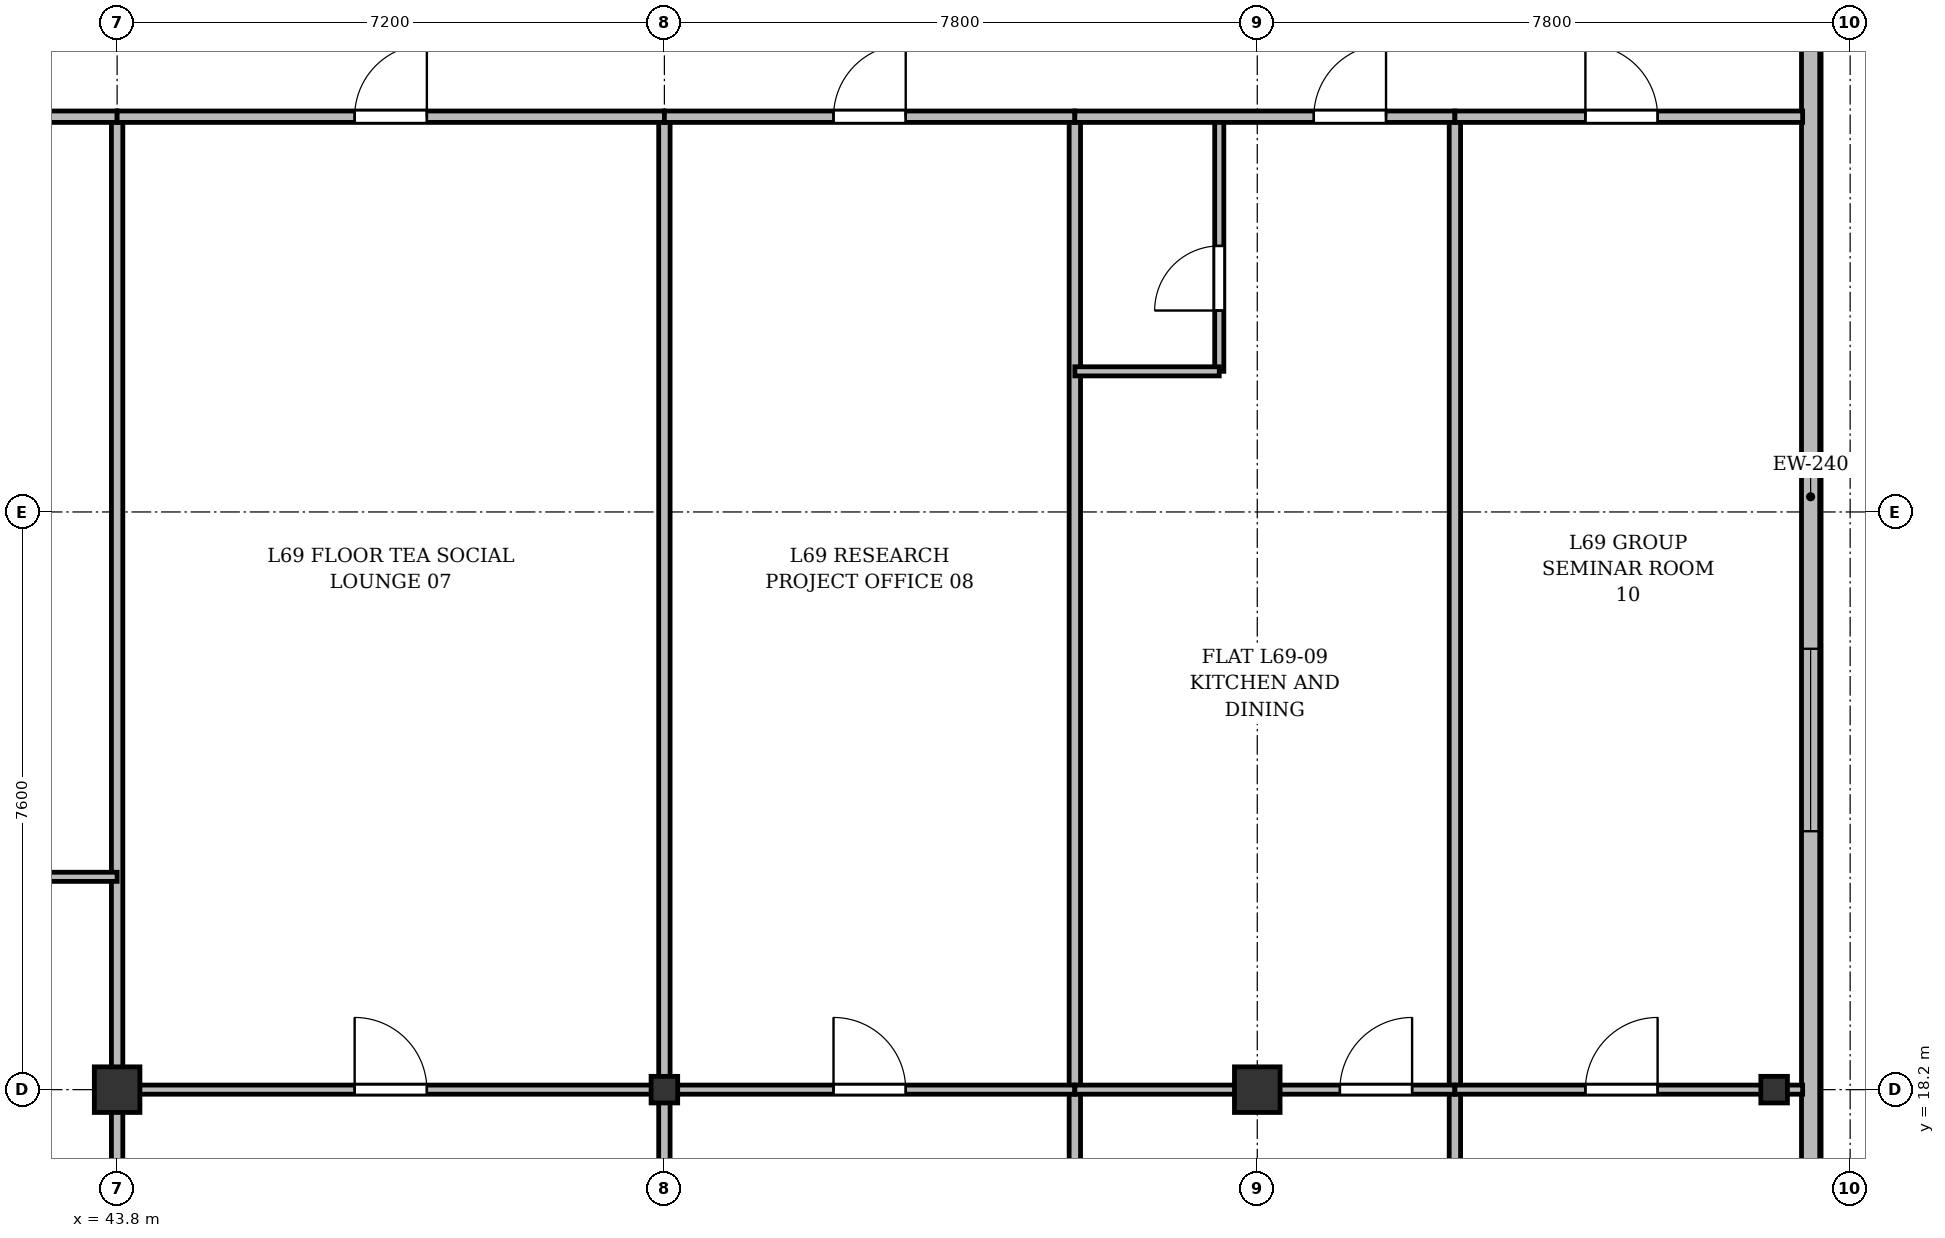
"""IFC4 building model, lengths in metres.
Left out: names, types, materials, properties, quantities, classifications, styles, units other than length and angle.
Written with IfcOpenShell. Run it as: python <this file> out.ifc"""

import sys

from ifc_helpers import new_model, si_unit, direction, frame, frame_2d, origin, origin_2d, place, context, subcontext, project, spatial, rectangle, i_section, extrude, source, transform, mapped, element, fill, save


model = new_model("IFC4")
c1 = context("Model", 3, precision=1e-05, world=origin(), true_north=direction((0.0, 1.0)))
c2 = subcontext(c1, "Body", "Model", "MODEL_VIEW")
j1 = project(units=[si_unit("LENGTHUNIT", "METRE"), si_unit("PLANEANGLEUNIT", "RADIAN")], contexts=[c1])
p1 = place(None, origin())
s1 = spatial("IfcSite", under=j1, at=p1, CompositionType="ELEMENT")
p2 = place(p1, origin())
s2 = spatial("IfcBuilding", under=s1, at=p2, CompositionType="ELEMENT")
p3 = place(p2, frame((0.0, 0.0, 266.7)))
s3 = spatial("IfcBuildingStorey", under=s2, at=p3, CompositionType="ELEMENT", Elevation=266.7)
m1 = source(origin(), c2, "Body", "SweptSolid", [
    extrude(rectangle(XDim=0.6, YDim=0.6, at=origin_2d()), origin(), (0.0, 0.0, 1.0), 3.6),
])
p4 = place(p3, frame((43.8, 18.2, 0.0), z_axis=(0.0, 0.0, 1.0), x_axis=(1.0, 0.0, 0.0)))
e1 = element("IfcColumn", 1, at=p4, inside=s3, PredefinedType="COLUMN", context=c2, shape_type="MappedRepresentation", body=[
    mapped(m1, transform((0.0, 0.0, 0.0), x_axis=(1.0, 0.0, 0.0), y_axis=(0.0, 1.0, 0.0), z_axis=(0.0, 0.0, 1.0), scale=1.0)),
])
m2 = source(origin(), c2, "Body", "SweptSolid", [
    extrude(i_section(OverallWidth=0.35, OverallDepth=0.35, WebThickness=0.018, FlangeThickness=0.028, at=origin_2d()), origin(), (0.0, 0.0, 1.0), 3.6),
])
p5 = place(p3, frame((51.0, 18.2, 0.0), z_axis=(0.0, 0.0, 1.0), x_axis=(1.0, 0.0, 0.0)))
e2 = element("IfcColumn", 2, at=p5, inside=s3, PredefinedType="COLUMN", context=c2, shape_type="MappedRepresentation", body=[
    mapped(m2, transform((0.0, 0.0, 0.0), x_axis=(1.0, 0.0, 0.0), y_axis=(0.0, 1.0, 0.0), z_axis=(0.0, 0.0, 1.0), scale=1.0)),
])
p6 = place(p3, frame((58.8, 18.2, 0.0), z_axis=(0.0, 0.0, 1.0), x_axis=(1.0, 0.0, 0.0)))
e3 = element("IfcColumn", 3, at=p6, inside=s3, PredefinedType="COLUMN", context=c2, shape_type="MappedRepresentation", body=[
    mapped(m1, transform((0.0, 0.0, 0.0), x_axis=(1.0, 0.0, 0.0), y_axis=(0.0, 1.0, 0.0), z_axis=(0.0, 0.0, 1.0), scale=1.0)),
])
p7 = place(p3, frame((65.6, 18.2, 0.0), z_axis=(0.0, 0.0, 1.0), x_axis=(1.0, 0.0, 0.0)))
e4 = element("IfcColumn", 4, at=p7, inside=s3, PredefinedType="COLUMN", context=c2, shape_type="MappedRepresentation", body=[
    mapped(m2, transform((0.0, 0.0, 0.0), x_axis=(1.0, 0.0, 0.0), y_axis=(0.0, 1.0, 0.0), z_axis=(0.0, 0.0, 1.0), scale=1.0)),
])
p8 = place(p3, frame((66.08, 45.5, 0.0), z_axis=(0.0, 0.0, 1.0), x_axis=(0.0, -1.0, 0.0)))
e5 = element("IfcWall", 5, at=p8, inside=s3, PredefinedType="SOLIDWALL", context=c2, shape_type="SweptSolid", body=[
    extrude(rectangle(XDim=39.0, YDim=0.24, at=frame_2d((19.5, 0.0))), origin(), (0.0, 0.0, 1.0), 3.37),
])
p9 = place(p8, frame((36.35, 0.0, 0.92)))
e6 = element("IfcOpeningElement", 6, at=p9, cuts=e5, PredefinedType="OPENING", context=c2, shape_type="SweptSolid", body=[
    extrude(rectangle(XDim=1.2, YDim=1.65, at=frame_2d((0.6, 0.825))), frame((0.0, 0.13, 0.0), z_axis=(0.0, -1.0, 0.0), x_axis=(1.0, 0.0, 0.0)), (0.0, 0.0, 1.0), 0.26),
])
p10 = place(p8, frame((32.9, 0.0, 0.92)))
e7 = element("IfcOpeningElement", 7, at=p10, cuts=e5, PredefinedType="OPENING", context=c2, shape_type="SweptSolid", body=[
    extrude(rectangle(XDim=2.4, YDim=2.1, at=frame_2d((1.2, 1.05))), frame((0.0, 0.13, 0.0), z_axis=(0.0, -1.0, 0.0), x_axis=(1.0, 0.0, 0.0)), (0.0, 0.0, 1.0), 0.26),
])
p11 = place(p8, frame((28.7, 0.0, 0.92)))
e8 = element("IfcOpeningElement", 8, at=p11, cuts=e5, PredefinedType="OPENING", context=c2, shape_type="SweptSolid", body=[
    extrude(rectangle(XDim=2.4, YDim=2.1, at=frame_2d((1.2, 1.05))), frame((0.0, 0.13, 0.0), z_axis=(0.0, -1.0, 0.0), x_axis=(1.0, 0.0, 0.0)), (0.0, 0.0, 1.0), 0.26),
])
p12 = place(p8, frame((21.5, 0.0, 0.92)))
e9 = element("IfcOpeningElement", 9, at=p12, cuts=e5, PredefinedType="OPENING", context=c2, shape_type="SweptSolid", body=[
    extrude(rectangle(XDim=2.4, YDim=2.1, at=frame_2d((1.2, 1.05))), frame((0.0, 0.13, 0.0), z_axis=(0.0, -1.0, 0.0), x_axis=(1.0, 0.0, 0.0)), (0.0, 0.0, 1.0), 0.26),
])
p13 = place(p8, frame((7.5, 0.0, 0.92)))
e10 = element("IfcOpeningElement", 10, at=p13, cuts=e5, PredefinedType="OPENING", context=c2, shape_type="SweptSolid", body=[
    extrude(rectangle(XDim=2.4, YDim=2.1, at=frame_2d((1.2, 1.05))), frame((0.0, 0.13, 0.0), z_axis=(0.0, -1.0, 0.0), x_axis=(1.0, 0.0, 0.0)), (0.0, 0.0, 1.0), 0.26),
])
p14 = place(p8, frame((4.5, 0.0, 0.92)))
e11 = element("IfcOpeningElement", 11, at=p14, cuts=e5, PredefinedType="OPENING", context=c2, shape_type="SweptSolid", body=[
    extrude(rectangle(XDim=1.2, YDim=1.65, at=frame_2d((0.6, 0.825))), frame((0.0, 0.13, 0.0), z_axis=(0.0, -1.0, 0.0), x_axis=(1.0, 0.0, 0.0)), (0.0, 0.0, 1.0), 0.26),
])
p15 = place(p8, frame((1.15, 0.0, 0.92)))
e12 = element("IfcOpeningElement", 12, at=p15, cuts=e5, PredefinedType="OPENING", context=c2, shape_type="SweptSolid", body=[
    extrude(rectangle(XDim=1.2, YDim=1.65, at=frame_2d((0.6, 0.825))), frame((0.0, 0.13, 0.0), z_axis=(0.0, -1.0, 0.0), x_axis=(1.0, 0.0, 0.0)), (0.0, 0.0, 1.0), 0.26),
])
for number, where, z_axis, x_axis in (
    (13, (43.8, 3.725, 0.0), (0.0, 0.0, 1.0), (0.0, 1.0, 0.0)),
    (14, (51.0, 3.725, 0.0), (0.0, 0.0, 1.0), (0.0, 1.0, 0.0)),
):
    element("IfcWall", number, at=place(p3, frame(where, z_axis=z_axis, x_axis=x_axis)), inside=s3, PredefinedType="PARTITIONING", context=c2, shape_type="SweptSolid", body=[
        extrude(rectangle(XDim=27.275, YDim=0.15, at=frame_2d((13.637, 0.0))), origin(), (0.0, 0.0, 1.0), 2.87),
    ])
for number, where, z_axis, x_axis in (
    (15, (56.4, 3.725, 0.0), (0.0, 0.0, 1.0), (0.0, 1.0, 0.0)),
    (16, (61.4, 3.725, 0.0), (0.0, 0.0, 1.0), (0.0, 1.0, 0.0)),
):
    element("IfcWall", number, at=place(p3, frame(where, z_axis=z_axis, x_axis=x_axis)), inside=s3, PredefinedType="PARTITIONING", context=c2, shape_type="SweptSolid", body=[
        extrude(rectangle(XDim=27.275, YDim=0.15, at=frame_2d((13.637, 0.0))), origin(), (0.0, 0.0, 1.0), 2.92),
    ])
p16 = place(p3, frame((36.4, 21.0, 0.0), z_axis=(0.0, 0.0, 1.0), x_axis=(1.0, 0.0, 0.0)))
e17 = element("IfcWall", 17, at=p16, inside=s3, PredefinedType="PARTITIONING", context=c2, shape_type="SweptSolid", body=[
    extrude(rectangle(XDim=7.4, YDim=0.12, at=frame_2d((3.7, 0.0))), origin(), (0.0, 0.0, 1.0), 2.87),
])
p17 = place(p16, frame((3.133, 0.0, 0.0)))
e18 = element("IfcOpeningElement", 18, at=p17, cuts=e17, PredefinedType="OPENING", context=c2, shape_type="SweptSolid", body=[
    extrude(rectangle(XDim=0.95, YDim=2.15, at=frame_2d((0.475, 1.075))), frame((0.0, 0.07, 0.0), z_axis=(0.0, -1.0, 0.0), x_axis=(1.0, 0.0, 0.0)), (0.0, 0.0, 1.0), 0.14),
])
p18 = place(p3, frame((36.4, 31.0, 0.0), z_axis=(0.0, 0.0, 1.0), x_axis=(1.0, 0.0, 0.0)))
e19 = element("IfcWall", 19, at=p18, inside=s3, PredefinedType="PARTITIONING", context=c2, shape_type="SweptSolid", body=[
    extrude(rectangle(XDim=7.4, YDim=0.15, at=frame_2d((3.7, 0.0))), origin(), (0.0, 0.0, 1.0), 2.87),
])
p19 = place(p18, frame((4.967, 0.0, 0.0)))
e20 = element("IfcOpeningElement", 20, at=p19, cuts=e19, PredefinedType="OPENING", context=c2, shape_type="SweptSolid", body=[
    extrude(rectangle(XDim=0.95, YDim=2.15, at=frame_2d((0.475, 1.075))), frame((0.0, 0.085, 0.0), z_axis=(0.0, -1.0, 0.0), x_axis=(1.0, 0.0, 0.0)), (0.0, 0.0, 1.0), 0.17),
])
p20 = place(p3, frame((43.8, 31.0, 0.0), z_axis=(0.0, 0.0, 1.0), x_axis=(1.0, 0.0, 0.0)))
e21 = element("IfcWall", 21, at=p20, inside=s3, PredefinedType="PARTITIONING", context=c2, shape_type="SweptSolid", body=[
    extrude(rectangle(XDim=7.2, YDim=0.15, at=frame_2d((3.6, 0.0))), origin(), (0.0, 0.0, 1.0), 2.87),
])
p21 = place(p20, frame((3.125, 0.0, 0.0)))
e22 = element("IfcOpeningElement", 22, at=p21, cuts=e21, PredefinedType="OPENING", context=c2, shape_type="SweptSolid", body=[
    extrude(rectangle(XDim=0.95, YDim=2.15, at=frame_2d((0.475, 1.075))), frame((0.0, 0.085, 0.0), z_axis=(0.0, -1.0, 0.0), x_axis=(1.0, 0.0, 0.0)), (0.0, 0.0, 1.0), 0.17),
])
p22 = place(p3, frame((43.8, 18.2, 0.0), z_axis=(0.0, 0.0, 1.0), x_axis=(1.0, 0.0, 0.0)))
e23 = element("IfcWall", 23, at=p22, inside=s3, PredefinedType="PARTITIONING", context=c2, shape_type="SweptSolid", body=[
    extrude(rectangle(XDim=7.2, YDim=0.12, at=frame_2d((3.6, 0.0))), origin(), (0.0, 0.0, 1.0), 2.92),
])
p23 = place(p22, frame((3.125, 0.0, 0.0)))
e24 = element("IfcOpeningElement", 24, at=p23, cuts=e23, PredefinedType="OPENING", context=c2, shape_type="SweptSolid", body=[
    extrude(rectangle(XDim=0.95, YDim=2.15, at=frame_2d((0.475, 1.075))), frame((0.0, 0.07, 0.0), z_axis=(0.0, -1.0, 0.0), x_axis=(1.0, 0.0, 0.0)), (0.0, 0.0, 1.0), 0.14),
])
p24 = place(p3, frame((51.0, 31.0, 0.0), z_axis=(0.0, 0.0, 1.0), x_axis=(1.0, 0.0, 0.0)))
e25 = element("IfcWall", 25, at=p24, inside=s3, PredefinedType="PARTITIONING", context=c2, shape_type="SweptSolid", body=[
    extrude(rectangle(XDim=5.4, YDim=0.15, at=frame_2d((2.7, 0.0))), origin(), (0.0, 0.0, 1.0), 2.87),
])
p25 = place(p24, frame((2.225, 0.0, 0.0)))
e26 = element("IfcOpeningElement", 26, at=p25, cuts=e25, PredefinedType="OPENING", context=c2, shape_type="SweptSolid", body=[
    extrude(rectangle(XDim=0.95, YDim=2.15, at=frame_2d((0.475, 1.075))), frame((0.0, 0.085, 0.0), z_axis=(0.0, -1.0, 0.0), x_axis=(1.0, 0.0, 0.0)), (0.0, 0.0, 1.0), 0.17),
])
p26 = place(p3, frame((51.0, 18.2, 0.0), z_axis=(0.0, 0.0, 1.0), x_axis=(1.0, 0.0, 0.0)))
e27 = element("IfcWall", 27, at=p26, inside=s3, PredefinedType="PARTITIONING", context=c2, shape_type="SweptSolid", body=[
    extrude(rectangle(XDim=5.4, YDim=0.12, at=frame_2d((2.7, 0.0))), origin(), (0.0, 0.0, 1.0), 2.92),
])
p27 = place(p26, frame((2.225, 0.0, 0.0)))
e28 = element("IfcOpeningElement", 28, at=p27, cuts=e27, PredefinedType="OPENING", context=c2, shape_type="SweptSolid", body=[
    extrude(rectangle(XDim=0.95, YDim=2.15, at=frame_2d((0.475, 1.075))), frame((0.0, 0.07, 0.0), z_axis=(0.0, -1.0, 0.0), x_axis=(1.0, 0.0, 0.0)), (0.0, 0.0, 1.0), 0.14),
])
p28 = place(p3, frame((56.4, 18.2, 0.0), z_axis=(0.0, 0.0, 1.0), x_axis=(1.0, 0.0, 0.0)))
e29 = element("IfcWall", 29, at=p28, inside=s3, PredefinedType="PARTITIONING", context=c2, shape_type="SweptSolid", body=[
    extrude(rectangle(XDim=5.0, YDim=0.12, at=frame_2d((2.5, 0.0))), origin(), (0.0, 0.0, 1.0), 2.92),
])
p29 = place(p28, frame((3.487, 0.0, 0.0)))
e30 = element("IfcOpeningElement", 30, at=p29, cuts=e29, PredefinedType="OPENING", context=c2, shape_type="SweptSolid", body=[
    extrude(rectangle(XDim=0.95, YDim=2.15, at=frame_2d((0.475, 1.075))), frame((0.0, 0.07, 0.0), z_axis=(0.0, -1.0, 0.0), x_axis=(1.0, 0.0, 0.0)), (0.0, 0.0, 1.0), 0.14),
])
p30 = place(p3, frame((58.3, 27.65, 0.0), z_axis=(0.0, 0.0, 1.0), x_axis=(0.0, 1.0, 0.0)))
e31 = element("IfcWall", 31, at=p30, inside=s3, PredefinedType="PARTITIONING", context=c2, shape_type="SweptSolid", body=[
    extrude(rectangle(XDim=3.35, YDim=0.12, at=frame_2d((1.675, 0.0))), origin(), (0.0, 0.0, 1.0), 3.37),
])
p31 = place(p30, frame((0.8, 0.0, 0.0)))
e32 = element("IfcOpeningElement", 32, at=p31, cuts=e31, PredefinedType="OPENING", context=c2, shape_type="SweptSolid", body=[
    extrude(rectangle(XDim=0.85, YDim=2.1, at=frame_2d((0.425, 1.05))), frame((0.0, 0.07, 0.0), z_axis=(0.0, -1.0, 0.0), x_axis=(1.0, 0.0, 0.0)), (0.0, 0.0, 1.0), 0.14),
])
p32 = place(p3, frame((56.4, 27.65, 0.0), z_axis=(0.0, 0.0, 1.0), x_axis=(1.0, 0.0, 0.0)))
e33 = element("IfcWall", 33, at=p32, inside=s3, PredefinedType="PARTITIONING", context=c2, shape_type="SweptSolid", body=[
    extrude(rectangle(XDim=1.9, YDim=0.12, at=frame_2d((0.95, 0.0))), origin(), (0.0, 0.0, 1.0), 3.37),
])
p33 = place(p3, frame((56.4, 31.0, 0.0), z_axis=(0.0, 0.0, 1.0), x_axis=(1.0, 0.0, 0.0)))
e34 = element("IfcWall", 34, at=p33, inside=s3, PredefinedType="PARTITIONING", context=c2, shape_type="SweptSolid", body=[
    extrude(rectangle(XDim=5.0, YDim=0.15, at=frame_2d((2.5, 0.0))), origin(), (0.0, 0.0, 1.0), 2.87),
])
p34 = place(p33, frame((3.144, 0.0, 0.0)))
e35 = element("IfcOpeningElement", 35, at=p34, cuts=e34, PredefinedType="OPENING", context=c2, shape_type="SweptSolid", body=[
    extrude(rectangle(XDim=0.95, YDim=2.15, at=frame_2d((0.475, 1.075))), frame((0.0, 0.085, 0.0), z_axis=(0.0, -1.0, 0.0), x_axis=(1.0, 0.0, 0.0)), (0.0, 0.0, 1.0), 0.17),
])
p35 = place(p3, frame((61.4, 31.0, 0.0), z_axis=(0.0, 0.0, 1.0), x_axis=(1.0, 0.0, 0.0)))
e36 = element("IfcWall", 36, at=p35, inside=s3, PredefinedType="PARTITIONING", context=c2, shape_type="SweptSolid", body=[
    extrude(rectangle(XDim=4.575, YDim=0.15, at=frame_2d((2.288, 0.0))), origin(), (0.0, 0.0, 1.0), 2.87),
])
p36 = place(p35, frame((1.717, 0.0, 0.0)))
e37 = element("IfcOpeningElement", 37, at=p36, cuts=e36, PredefinedType="OPENING", context=c2, shape_type="SweptSolid", body=[
    extrude(rectangle(XDim=0.95, YDim=2.15, at=frame_2d((0.475, 1.075))), frame((0.0, 0.085, 0.0), z_axis=(0.0, -1.0, 0.0), x_axis=(1.0, 0.0, 0.0)), (0.0, 0.0, 1.0), 0.17),
])
p37 = place(p3, frame((61.4, 18.2, 0.0), z_axis=(0.0, 0.0, 1.0), x_axis=(1.0, 0.0, 0.0)))
e38 = element("IfcWall", 38, at=p37, inside=s3, PredefinedType="PARTITIONING", context=c2, shape_type="SweptSolid", body=[
    extrude(rectangle(XDim=4.575, YDim=0.12, at=frame_2d((2.288, 0.0))), origin(), (0.0, 0.0, 1.0), 2.92),
])
p38 = place(p37, frame((1.717, 0.0, 0.0)))
e39 = element("IfcOpeningElement", 39, at=p38, cuts=e38, PredefinedType="OPENING", context=c2, shape_type="SweptSolid", body=[
    extrude(rectangle(XDim=0.95, YDim=2.15, at=frame_2d((0.475, 1.075))), frame((0.0, 0.07, 0.0), z_axis=(0.0, -1.0, 0.0), x_axis=(1.0, 0.0, 0.0)), (0.0, 0.0, 1.0), 0.14),
])
m3 = source(origin(), c2, "Body", "SweptSolid", [
    extrude(rectangle(XDim=2.4, YDim=2.1, at=frame_2d((1.2, 1.05))), frame((0.0, 0.03, 0.0), z_axis=(0.0, -1.0, 0.0), x_axis=(1.0, 0.0, 0.0)), (0.0, 0.0, 1.0), 0.06),
])
p39 = place(p12, origin())
e40 = element("IfcWindow", 40, at=p39, inside=s3, PartitioningType="SINGLE_PANEL", PredefinedType="WINDOW", context=c2, shape_type="MappedRepresentation", body=[
    mapped(m3, transform((0.0, 0.0, 0.0), x_axis=(1.0, 0.0, 0.0), y_axis=(0.0, 1.0, 0.0), z_axis=(0.0, 0.0, 1.0), scale=1.0)),
])
fill(e9, e40)
m4 = source(origin(), c2, "Body", "SweptSolid", [
    extrude(rectangle(XDim=0.95, YDim=2.15, at=frame_2d((0.475, 1.075))), frame((0.0, 0.025, 0.0), z_axis=(0.0, -1.0, 0.0), x_axis=(1.0, 0.0, 0.0)), (0.0, 0.0, 1.0), 0.05),
])
p40 = place(p21, origin())
e41 = element("IfcDoor", 41, at=p40, inside=s3, OperationType="SINGLE_SWING_RIGHT", PredefinedType="DOOR", context=c2, shape_type="MappedRepresentation", body=[
    mapped(m4, transform((0.0, 0.0, 0.0), x_axis=(1.0, 0.0, 0.0), y_axis=(0.0, 1.0, 0.0), z_axis=(0.0, 0.0, 1.0), scale=1.0)),
])
fill(e22, e41)
p41 = place(p23, origin())
e42 = element("IfcDoor", 42, at=p41, inside=s3, OperationType="SINGLE_SWING_LEFT", PredefinedType="DOOR", context=c2, shape_type="MappedRepresentation", body=[
    mapped(m4, transform((0.0, 0.0, 0.0), x_axis=(1.0, 0.0, 0.0), y_axis=(0.0, 1.0, 0.0), z_axis=(0.0, 0.0, 1.0), scale=1.0)),
])
fill(e24, e42)
p42 = place(p25, origin())
e43 = element("IfcDoor", 43, at=p42, inside=s3, OperationType="SINGLE_SWING_RIGHT", PredefinedType="DOOR", context=c2, shape_type="MappedRepresentation", body=[
    mapped(m4, transform((0.0, 0.0, 0.0), x_axis=(1.0, 0.0, 0.0), y_axis=(0.0, 1.0, 0.0), z_axis=(0.0, 0.0, 1.0), scale=1.0)),
])
fill(e26, e43)
p43 = place(p27, origin())
e44 = element("IfcDoor", 44, at=p43, inside=s3, OperationType="SINGLE_SWING_LEFT", PredefinedType="DOOR", context=c2, shape_type="MappedRepresentation", body=[
    mapped(m4, transform((0.0, 0.0, 0.0), x_axis=(1.0, 0.0, 0.0), y_axis=(0.0, 1.0, 0.0), z_axis=(0.0, 0.0, 1.0), scale=1.0)),
])
fill(e28, e44)
p44 = place(p29, origin())
e45 = element("IfcDoor", 45, at=p44, inside=s3, OperationType="SINGLE_SWING_RIGHT", PredefinedType="DOOR", context=c2, shape_type="MappedRepresentation", body=[
    mapped(m4, transform((0.0, 0.0, 0.0), x_axis=(1.0, 0.0, 0.0), y_axis=(0.0, 1.0, 0.0), z_axis=(0.0, 0.0, 1.0), scale=1.0)),
])
fill(e30, e45)
m5 = source(origin(), c2, "Body", "SweptSolid", [
    extrude(rectangle(XDim=0.85, YDim=2.1, at=frame_2d((0.425, 1.05))), frame((0.0, 0.025, 0.0), z_axis=(0.0, -1.0, 0.0), x_axis=(1.0, 0.0, 0.0)), (0.0, 0.0, 1.0), 0.05),
])
p45 = place(p31, origin())
e46 = element("IfcDoor", 46, at=p45, inside=s3, OperationType="SINGLE_SWING_LEFT", PredefinedType="DOOR", context=c2, shape_type="MappedRepresentation", body=[
    mapped(m5, transform((0.0, 0.0, 0.0), x_axis=(1.0, 0.0, 0.0), y_axis=(0.0, 1.0, 0.0), z_axis=(0.0, 0.0, 1.0), scale=1.0)),
])
fill(e32, e46)
p46 = place(p34, origin())
e47 = element("IfcDoor", 47, at=p46, inside=s3, OperationType="SINGLE_SWING_RIGHT", PredefinedType="DOOR", context=c2, shape_type="MappedRepresentation", body=[
    mapped(m4, transform((0.0, 0.0, 0.0), x_axis=(1.0, 0.0, 0.0), y_axis=(0.0, 1.0, 0.0), z_axis=(0.0, 0.0, 1.0), scale=1.0)),
])
fill(e35, e47)
p47 = place(p36, origin())
e48 = element("IfcDoor", 48, at=p47, inside=s3, OperationType="SINGLE_SWING_LEFT", PredefinedType="DOOR", context=c2, shape_type="MappedRepresentation", body=[
    mapped(m4, transform((0.0, 0.0, 0.0), x_axis=(1.0, 0.0, 0.0), y_axis=(0.0, 1.0, 0.0), z_axis=(0.0, 0.0, 1.0), scale=1.0)),
])
fill(e37, e48)
p48 = place(p38, origin())
e49 = element("IfcDoor", 49, at=p48, inside=s3, OperationType="SINGLE_SWING_RIGHT", PredefinedType="DOOR", context=c2, shape_type="MappedRepresentation", body=[
    mapped(m4, transform((0.0, 0.0, 0.0), x_axis=(1.0, 0.0, 0.0), y_axis=(0.0, 1.0, 0.0), z_axis=(0.0, 0.0, 1.0), scale=1.0)),
])
fill(e39, e49)
save(model, sys.argv[1])
